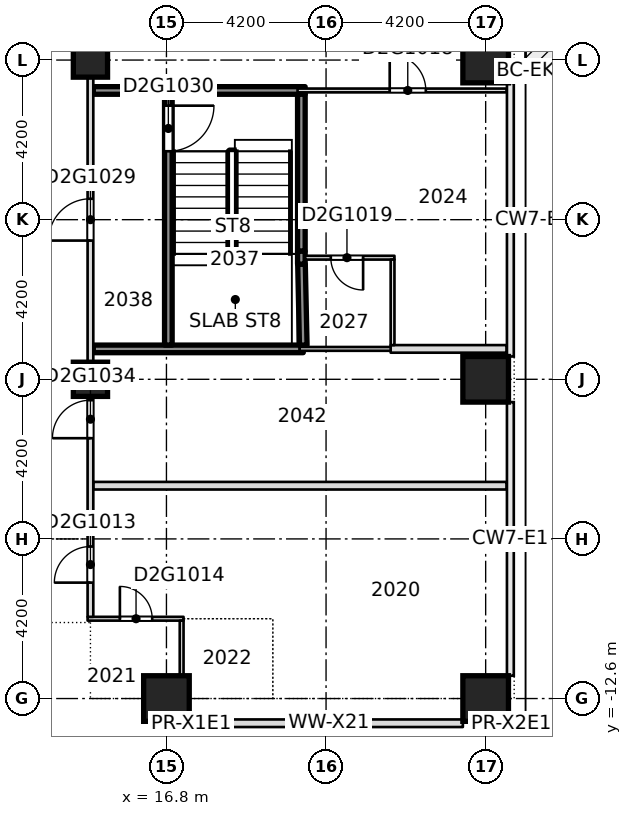
"""IFC4 building model, lengths in metres.
Left out: names, types, materials, properties, quantities, classifications, styles, units other than length and angle.
Written with IfcOpenShell. Run it as: python <this file> out.ifc"""

import sys

from ifc_helpers import new_model, si_unit, direction, frame, frame_2d, origin, origin_2d, place, context, subcontext, project, spatial, rectangle, extrude, element, fill, save


model = new_model("IFC4")
c1 = context("Model", 3, precision=1e-05, world=origin(), true_north=direction((0.0, 1.0)))
c2 = subcontext(c1, "Body", "Model", "MODEL_VIEW")
j1 = project(units=[si_unit("LENGTHUNIT", "METRE"), si_unit("PLANEANGLEUNIT", "RADIAN")], contexts=[c1])
p1 = place(None, origin())
s1 = spatial("IfcSite", under=j1, at=p1, CompositionType="ELEMENT")
p2 = place(p1, origin())
s2 = spatial("IfcBuilding", under=s1, at=p2, CompositionType="ELEMENT")
p3 = place(p2, frame((0.0, 0.0, 83.85)))
s3 = spatial("IfcBuildingStorey", under=s2, at=p3, CompositionType="ELEMENT", Elevation=83.85)
for number, where, z_axis, x_axis in (
    (1, (16.8, -12.6, -0.32), (0.0, 0.0, 1.0), (1.0, 0.0, 0.0)),
    (2, (25.2, -12.6, -0.32), (0.0, 0.0, 1.0), (1.0, 0.0, 0.0)),
    (3, (25.2, -4.2, -0.32), (0.0, 0.0, 1.0), (1.0, 0.0, 0.0)),
    (4, (25.2, 4.2, -0.32), (0.0, 0.0, 1.0), (1.0, 0.0, 0.0)),
):
    element("IfcColumn", number, at=place(p3, frame(where, z_axis=z_axis, x_axis=x_axis)), inside=s3, PredefinedType="COLUMN", context=c2, shape_type="SweptSolid", body=[
        extrude(rectangle(XDim=1.2, YDim=1.2, at=origin_2d()), origin(), (0.0, 0.0, 1.0), 3.45),
    ])
for number, where, z_axis, x_axis in (
    (5, (14.8, -4.2, -0.32), (0.0, 0.0, 1.0), (1.0, 0.0, 0.0)),
    (6, (14.8, 4.2, -0.32), (0.0, 0.0, 1.0), (1.0, 0.0, 0.0)),
):
    element("IfcColumn", number, at=place(p3, frame(where, z_axis=z_axis, x_axis=x_axis)), inside=s3, PredefinedType="COLUMN", context=c2, shape_type="SweptSolid", body=[
        extrude(rectangle(XDim=0.9, YDim=0.9, at=origin_2d()), origin(), (0.0, 0.0, 1.0), 3.45),
    ])
p4 = place(p3, frame((14.725, -10.5, 0.0), z_axis=(0.0, 0.0, 1.0), x_axis=(1.0, 0.0, 0.0)))
e7 = element("IfcWall", 7, at=p4, inside=s3, PredefinedType="PARTITIONING", context=c2, shape_type="SweptSolid", body=[
    extrude(rectangle(XDim=2.525, YDim=0.1, at=frame_2d((1.262, 0.0))), origin(), (0.0, 0.0, 1.0), 3.13),
])
p5 = place(p4, frame((0.85, 0.0, 0.0)))
e8 = element("IfcOpeningElement", 8, at=p5, cuts=e7, PredefinedType="OPENING", context=c2, shape_type="SweptSolid", body=[
    extrude(rectangle(XDim=0.85, YDim=2.1, at=frame_2d((0.425, 1.05))), frame((0.0, 0.06, 0.0), z_axis=(0.0, -1.0, 0.0), x_axis=(1.0, 0.0, 0.0)), (0.0, 0.0, 1.0), 0.12),
])
p6 = place(p3, frame((14.875, -7.0, 0.0), z_axis=(0.0, 0.0, 1.0), x_axis=(1.0, 0.0, 0.0)))
e9 = element("IfcWall", 9, at=p6, inside=s3, PredefinedType="PARTITIONING", context=c2, shape_type="SweptSolid", body=[
    extrude(rectangle(XDim=10.875, YDim=0.2, at=frame_2d((5.438, 0.0))), origin(), (0.0, 0.0, 1.0), 3.13),
])
p7 = place(p3, frame((14.875, -3.4, 0.0), z_axis=(0.0, 0.0, 1.0), x_axis=(1.0, 0.0, 0.0)))
e10 = element("IfcWall", 10, at=p7, inside=s3, PredefinedType="SOLIDWALL", context=c2, shape_type="SweptSolid", body=[
    extrude(rectangle(XDim=5.525, YDim=0.2, at=frame_2d((2.762, 0.0))), origin(), (0.0, 0.0, 1.0), 3.13),
])
p8 = place(p3, frame((20.3, -3.4, 0.0), z_axis=(0.0, 0.0, 1.0), x_axis=(1.0, 0.0, 0.0)))
e11 = element("IfcWall", 11, at=p8, inside=s3, PredefinedType="PARTITIONING", context=c2, shape_type="SweptSolid", body=[
    extrude(rectangle(XDim=2.5, YDim=0.1, at=frame_2d((1.25, 0.0))), origin(), (0.0, 0.0, 1.0), 3.13),
])
p9 = place(p3, frame((22.7, -3.4, 0.0), z_axis=(0.0, 0.0, 1.0), x_axis=(1.0, 0.0, 0.0)))
e12 = element("IfcWall", 12, at=p9, inside=s3, PredefinedType="PARTITIONING", context=c2, shape_type="SweptSolid", body=[
    extrude(rectangle(XDim=3.05, YDim=0.2, at=frame_2d((1.525, 0.0))), origin(), (0.0, 0.0, 1.0), 3.13),
])
p10 = place(p3, frame((20.45, -1.0, 0.0), z_axis=(0.0, 0.0, 1.0), x_axis=(1.0, 0.0, 0.0)))
e13 = element("IfcWall", 13, at=p10, inside=s3, PredefinedType="PARTITIONING", context=c2, shape_type="SweptSolid", body=[
    extrude(rectangle(XDim=2.35, YDim=0.1, at=frame_2d((1.175, 0.0))), origin(), (0.0, 0.0, 1.0), 3.13),
])
p11 = place(p10, frame((0.675, 0.0, 0.0)))
e14 = element("IfcOpeningElement", 14, at=p11, cuts=e13, PredefinedType="OPENING", context=c2, shape_type="SweptSolid", body=[
    extrude(rectangle(XDim=0.85, YDim=2.1, at=frame_2d((0.425, 1.05))), frame((0.0, 0.06, 0.0), z_axis=(0.0, -1.0, 0.0), x_axis=(1.0, 0.0, 0.0)), (0.0, 0.0, 1.0), 0.12),
])
p12 = place(p3, frame((14.875, 3.4, 0.0), z_axis=(0.0, 0.0, 1.0), x_axis=(1.0, 0.0, 0.0)))
e15 = element("IfcWall", 15, at=p12, inside=s3, PredefinedType="SOLIDWALL", context=c2, shape_type="SweptSolid", body=[
    extrude(rectangle(XDim=5.575, YDim=0.2, at=frame_2d((2.788, 0.0))), origin(), (0.0, 0.0, 1.0), 3.13),
])
p13 = place(p3, frame((20.25, 3.4, 0.0), z_axis=(0.0, 0.0, 1.0), x_axis=(1.0, 0.0, 0.0)))
e16 = element("IfcWall", 16, at=p13, inside=s3, PredefinedType="PARTITIONING", context=c2, shape_type="SweptSolid", body=[
    extrude(rectangle(XDim=5.5, YDim=0.1, at=frame_2d((2.75, 0.0))), origin(), (0.0, 0.0, 1.0), 3.13),
])
p14 = place(p13, frame((2.425, 0.0, 0.0)))
e17 = element("IfcOpeningElement", 17, at=p14, cuts=e16, PredefinedType="OPENING", context=c2, shape_type="SweptSolid", body=[
    extrude(rectangle(XDim=0.95, YDim=2.1, at=frame_2d((0.475, 1.05))), frame((0.0, 0.06, 0.0), z_axis=(0.0, -1.0, 0.0), x_axis=(1.0, 0.0, 0.0)), (0.0, 0.0, 1.0), 0.12),
])
p15 = place(p3, frame((14.8, -10.45, 0.0), z_axis=(0.0, 0.0, 1.0), x_axis=(0.0, 1.0, 0.0)))
e18 = element("IfcWall", 18, at=p15, inside=s3, PredefinedType="PARTITIONING", context=c2, shape_type="SweptSolid", body=[
    extrude(rectangle(XDim=20.875, YDim=0.15, at=frame_2d((10.438, 0.0))), origin(), (0.0, 0.0, 1.0), 3.13),
])
p16 = place(p15, frame((0.9, 0.0, 0.0)))
e19 = element("IfcOpeningElement", 19, at=p16, cuts=e18, PredefinedType="OPENING", context=c2, shape_type="SweptSolid", body=[
    extrude(rectangle(XDim=0.95, YDim=2.1, at=frame_2d((0.475, 1.05))), frame((0.0, 0.085, 0.0), z_axis=(0.0, -1.0, 0.0), x_axis=(1.0, 0.0, 0.0)), (0.0, 0.0, 1.0), 0.17),
])
p17 = place(p15, frame((16.9, 0.0, 0.0)))
e20 = element("IfcOpeningElement", 20, at=p17, cuts=e18, PredefinedType="OPENING", context=c2, shape_type="SweptSolid", body=[
    extrude(rectangle(XDim=1.0, YDim=2.1, at=frame_2d((0.5, 1.05))), frame((0.0, 0.085, 0.0), z_axis=(0.0, -1.0, 0.0), x_axis=(1.0, 0.0, 0.0)), (0.0, 0.0, 1.0), 0.17),
])
p18 = place(p15, frame((9.9, 0.0, 0.0)))
e21 = element("IfcOpeningElement", 21, at=p18, cuts=e18, PredefinedType="OPENING", context=c2, shape_type="SweptSolid", body=[
    extrude(rectangle(XDim=1.1, YDim=2.1, at=frame_2d((0.55, 1.05))), frame((0.0, 0.085, 0.0), z_axis=(0.0, -1.0, 0.0), x_axis=(1.0, 0.0, 0.0)), (0.0, 0.0, 1.0), 0.17),
])
p19 = place(p15, frame((4.7, 0.0, 0.0)))
e22 = element("IfcOpeningElement", 22, at=p19, cuts=e18, PredefinedType="OPENING", context=c2, shape_type="SweptSolid", body=[
    extrude(rectangle(XDim=1.0, YDim=2.1, at=frame_2d((0.5, 1.05))), frame((0.0, 0.085, 0.0), z_axis=(0.0, -1.0, 0.0), x_axis=(1.0, 0.0, 0.0)), (0.0, 0.0, 1.0), 0.17),
])
p20 = place(p3, frame((16.85, -3.3, 0.0), z_axis=(0.0, 0.0, 1.0), x_axis=(0.0, 1.0, 0.0)))
e23 = element("IfcWall", 23, at=p20, inside=s3, PredefinedType="SOLIDWALL", context=c2, shape_type="SweptSolid", body=[
    extrude(rectangle(XDim=6.6, YDim=0.2, at=frame_2d((3.3, 0.0))), origin(), (0.0, 0.0, 1.0), 3.13),
])
p21 = place(p20, frame((5.1, 0.0, 0.0)))
e24 = element("IfcOpeningElement", 24, at=p21, cuts=e23, PredefinedType="OPENING", context=c2, shape_type="SweptSolid", body=[
    extrude(rectangle(XDim=1.2, YDim=2.1, at=frame_2d((0.6, 1.05))), frame((0.0, 0.11, 0.0), z_axis=(0.0, -1.0, 0.0), x_axis=(1.0, 0.0, 0.0)), (0.0, 0.0, 1.0), 0.22),
])
p22 = place(p3, frame((17.2, -12.6, 0.0), z_axis=(0.0, 0.0, 1.0), x_axis=(0.0, 1.0, 0.0)))
e25 = element("IfcWall", 25, at=p22, inside=s3, PredefinedType="PARTITIONING", context=c2, shape_type="SweptSolid", body=[
    extrude(rectangle(XDim=2.05, YDim=0.1, at=frame_2d((1.025, 0.0))), origin(), (0.0, 0.0, 1.0), 3.13),
])
p23 = place(p3, frame((20.4, -3.3, 0.0), z_axis=(0.0, 0.0, 1.0), x_axis=(-0.021771342749, 0.999762976227, 0.0)))
e26 = element("IfcWall", 26, at=p23, inside=s3, PredefinedType="SOLIDWALL", context=c2, shape_type="SweptSolid", body=[
    extrude(rectangle(XDim=2.131, YDim=0.2, at=frame_2d((1.065, 0.0))), origin(), (0.0, 0.0, 1.0), 3.13),
])
p24 = place(p3, frame((20.35, -0.83, 0.0), z_axis=(0.0, 0.0, 1.0), x_axis=(0.0, 1.0, 0.0)))
e27 = element("IfcWall", 27, at=p24, inside=s3, PredefinedType="SOLIDWALL", context=c2, shape_type="SweptSolid", body=[
    extrude(rectangle(XDim=4.13, YDim=0.2, at=frame_2d((2.065, 0.0))), origin(), (0.0, 0.0, 1.0), 3.13),
])
p25 = place(p3, frame((22.75, -3.3, 0.0), z_axis=(0.0, 0.0, 1.0), x_axis=(0.0, 1.0, 0.0)))
e28 = element("IfcWall", 28, at=p25, inside=s3, PredefinedType="PARTITIONING", context=c2, shape_type="SweptSolid", body=[
    extrude(rectangle(XDim=2.25, YDim=0.1, at=frame_2d((1.125, 0.0))), origin(), (0.0, 0.0, 1.0), 3.13),
])
p26 = place(p3, frame((17.45, -20.4, 0.0), z_axis=(0.0, 0.0, 1.0), x_axis=(0.0, 1.0, 0.0)))
e29 = element("IfcWall", 29, at=p26, inside=s3, PredefinedType="STANDARD", context=c2, shape_type="SweptSolid", body=[
    extrude(rectangle(XDim=7.05, YDim=0.2, at=frame_2d((3.525, 0.0))), origin(), (0.0, 0.0, 1.0), 3.13),
])
p27 = place(p26, frame((0.35, 0.0, 0.2)))
e30 = element("IfcOpeningElement", 30, at=p27, cuts=e29, PredefinedType="OPENING", context=c2, shape_type="SweptSolid", body=[
    extrude(rectangle(XDim=1.8, YDim=2.65, at=frame_2d((0.9, 1.325))), frame((0.0, 0.11, 0.0), z_axis=(0.0, -1.0, 0.0), x_axis=(1.0, 0.0, 0.0)), (0.0, 0.0, 1.0), 0.22),
])
p28 = place(p26, frame((3.875, 0.0, 0.2)))
e31 = element("IfcOpeningElement", 31, at=p28, cuts=e29, PredefinedType="OPENING", context=c2, shape_type="SweptSolid", body=[
    extrude(rectangle(XDim=1.8, YDim=2.65, at=frame_2d((0.9, 1.325))), frame((0.0, 0.11, 0.0), z_axis=(0.0, -1.0, 0.0), x_axis=(1.0, 0.0, 0.0)), (0.0, 0.0, 1.0), 0.22),
])
p29 = place(p3, frame((17.55, -13.25, 0.0), z_axis=(0.0, 0.0, 1.0), x_axis=(1.0, 0.0, 0.0)))
e32 = element("IfcWall", 32, at=p29, inside=s3, PredefinedType="STANDARD", context=c2, shape_type="SweptSolid", body=[
    extrude(rectangle(XDim=7.05, YDim=0.2, at=frame_2d((3.525, 0.0))), origin(), (0.0, 0.0, 1.0), 3.13),
])
p30 = place(p3, frame((20.35, -1.17, 0.0), z_axis=(0.0, 0.0, 1.0), x_axis=(0.0, 1.0, 0.0)))
e33 = element("IfcWall", 33, at=p30, inside=s3, PredefinedType="SOLIDWALL", context=c2, shape_type="SweptSolid", body=[
    extrude(rectangle(XDim=0.34, YDim=0.2, at=frame_2d((0.17, 0.0))), origin(), (0.0, 0.0, 1.0), 3.13),
])
p31 = place(p16, origin())
e34 = element("IfcDoor", 34, at=p31, inside=s3, OperationType="SINGLE_SWING_RIGHT", PredefinedType="DOOR", context=c2, shape_type="SweptSolid", body=[
    extrude(rectangle(XDim=0.95, YDim=2.1, at=frame_2d((0.475, 1.05))), frame((0.0, 0.025, 0.0), z_axis=(0.0, -1.0, 0.0), x_axis=(1.0, 0.0, 0.0)), (0.0, 0.0, 1.0), 0.05),
])
fill(e19, e34)
p32 = place(p5, origin())
e35 = element("IfcDoor", 35, at=p32, inside=s3, OperationType="SINGLE_SWING_RIGHT", PredefinedType="DOOR", context=c2, shape_type="SweptSolid", body=[
    extrude(rectangle(XDim=0.85, YDim=2.1, at=frame_2d((0.425, 1.05))), frame((0.0, 0.025, 0.0), z_axis=(0.0, -1.0, 0.0), x_axis=(1.0, 0.0, 0.0)), (0.0, 0.0, 1.0), 0.05),
])
fill(e8, e35)
p33 = place(p14, origin())
e36 = element("IfcDoor", 36, at=p33, inside=s3, OperationType="SINGLE_SWING_LEFT", PredefinedType="DOOR", context=c2, shape_type="SweptSolid", body=[
    extrude(rectangle(XDim=0.95, YDim=2.1, at=frame_2d((0.475, 1.05))), frame((0.0, 0.025, 0.0), z_axis=(0.0, -1.0, 0.0), x_axis=(1.0, 0.0, 0.0)), (0.0, 0.0, 1.0), 0.05),
])
fill(e17, e36)
p34 = place(p11, origin())
e37 = element("IfcDoor", 37, at=p34, inside=s3, OperationType="SINGLE_SWING_RIGHT", PredefinedType="DOOR", context=c2, shape_type="SweptSolid", body=[
    extrude(rectangle(XDim=0.85, YDim=2.1, at=frame_2d((0.425, 1.05))), frame((0.0, 0.025, 0.0), z_axis=(0.0, -1.0, 0.0), x_axis=(1.0, 0.0, 0.0)), (0.0, 0.0, 1.0), 0.05),
])
fill(e14, e37)
p35 = place(p18, origin())
e38 = element("IfcDoor", 38, at=p35, inside=s3, OperationType="SINGLE_SWING_LEFT", PredefinedType="DOOR", context=c2, shape_type="SweptSolid", body=[
    extrude(rectangle(XDim=1.1, YDim=2.1, at=frame_2d((0.55, 1.05))), frame((0.0, 0.025, 0.0), z_axis=(0.0, -1.0, 0.0), x_axis=(1.0, 0.0, 0.0)), (0.0, 0.0, 1.0), 0.05),
])
fill(e21, e38)
p36 = place(p21, origin())
e39 = element("IfcDoor", 39, at=p36, inside=s3, OperationType="SINGLE_SWING_LEFT", PredefinedType="DOOR", context=c2, shape_type="SweptSolid", body=[
    extrude(rectangle(XDim=1.2, YDim=2.1, at=frame_2d((0.6, 1.05))), frame((0.0, 0.025, 0.0), z_axis=(0.0, -1.0, 0.0), x_axis=(1.0, 0.0, 0.0)), (0.0, 0.0, 1.0), 0.05),
])
fill(e24, e39)
p37 = place(p19, origin())
e40 = element("IfcDoor", 40, at=p37, inside=s3, OperationType="SINGLE_SWING_RIGHT", PredefinedType="DOOR", context=c2, shape_type="SweptSolid", body=[
    extrude(rectangle(XDim=1.0, YDim=2.1, at=frame_2d((0.5, 1.05))), frame((0.0, 0.025, 0.0), z_axis=(0.0, -1.0, 0.0), x_axis=(1.0, 0.0, 0.0)), (0.0, 0.0, 1.0), 0.05),
])
fill(e22, e40)
save(model, sys.argv[1])
